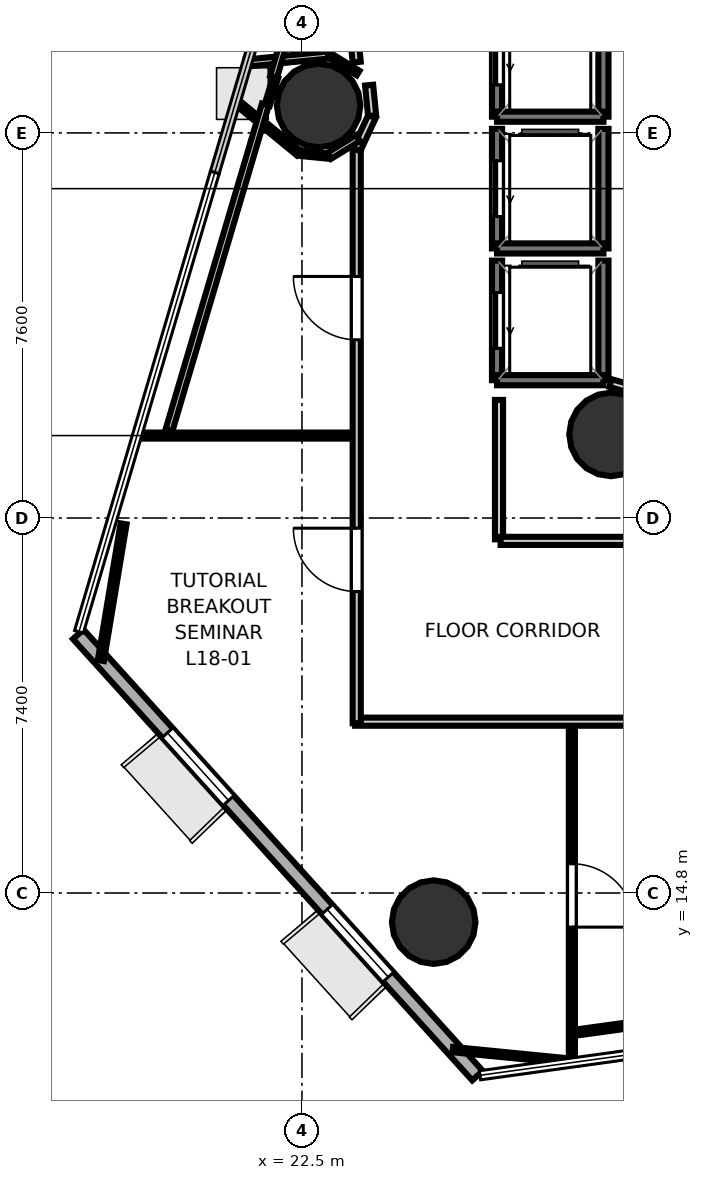
"""IFC4 building model, lengths in metres.
Left out: names, types, materials, properties, quantities, classifications, styles, units other than length and angle.
Written with IfcOpenShell. Run it as: python <this file> out.ifc"""

import sys

from ifc_helpers import new_model, si_unit, direction, frame, frame_2d, origin, origin_2d, place, context, subcontext, project, spatial, rectangle, hollow_circle, extrude, element, fill, save


model = new_model("IFC4")
c1 = context("Model", 3, precision=1e-05, world=origin(), true_north=direction((0.0, 1.0)))
c2 = subcontext(c1, "Body", "Model", "MODEL_VIEW")
j1 = project(units=[si_unit("LENGTHUNIT", "METRE"), si_unit("PLANEANGLEUNIT", "RADIAN")], contexts=[c1])
p1 = place(None, origin())
s1 = spatial("IfcSite", under=j1, at=p1, CompositionType="ELEMENT")
p2 = place(p1, origin())
s2 = spatial("IfcBuilding", under=s1, at=p2, CompositionType="ELEMENT")
p3 = place(p2, frame((0.0, 0.0, 74.7)))
s3 = spatial("IfcBuildingStorey", under=s2, at=p3, CompositionType="ELEMENT", Elevation=74.7)
for number, where, z_axis, x_axis in (
    (1, (28.6, 23.85, 0.0), (0.0, 0.0, 1.0), (1.0, 0.0, 0.0)),
    (2, (22.829, 30.34, 0.0), (0.0, 0.0, 1.0), (1.0, 0.0, 0.0)),
    (3, (25.1, 14.225, 0.0), (0.0, 0.0, 1.0), (1.0, 0.0, 0.0)),
):
    element("IfcColumn", number, at=place(p3, frame(where, z_axis=z_axis, x_axis=x_axis)), inside=s3, PredefinedType="COLUMN", context=c2, shape_type="SweptSolid", body=[
        extrude(hollow_circle(Radius=0.825, WallThickness=0.04, at=origin_2d()), origin(), (0.0, 0.0, 1.0), 3.7),
    ])
p4 = place(p3, frame((18.084, 19.906, 0.0), z_axis=(0.0, 0.0, 1.0), x_axis=(0.670879036758, -0.741566799445, 0.0)))
e4 = element("IfcWall", 4, at=p4, inside=s3, PredefinedType="SOLIDWALL", context=c2, shape_type="SweptSolid", body=[
    extrude(rectangle(XDim=11.746, YDim=0.28, at=frame_2d((5.873, 0.0))), origin(), (0.0, 0.0, 1.0), 3.52),
])
p5 = place(p4, frame((2.624, 0.0, 0.85)))
e5 = element("IfcOpeningElement", 5, at=p5, cuts=e4, PredefinedType="OPENING", context=c2, shape_type="SweptSolid", body=[
    extrude(rectangle(XDim=1.8, YDim=2.1, at=frame_2d((0.9, 1.05))), frame((0.0, 0.15, 0.0), z_axis=(0.0, -1.0, 0.0), x_axis=(1.0, 0.0, 0.0)), (0.0, 0.0, 1.0), 0.3),
])
p6 = place(p4, frame((7.323, 0.0, 0.85)))
e6 = element("IfcOpeningElement", 6, at=p6, cuts=e4, PredefinedType="OPENING", context=c2, shape_type="SweptSolid", body=[
    extrude(rectangle(XDim=1.8, YDim=2.1, at=frame_2d((0.9, 1.05))), frame((0.0, 0.15, 0.0), z_axis=(0.0, -1.0, 0.0), x_axis=(1.0, 0.0, 0.0)), (0.0, 0.0, 1.0), 0.3),
])
p7 = place(p3, frame((28.45, 30.12, 0.0), z_axis=(0.0, 0.0, 1.0), x_axis=(0.0, 1.0, 0.0)))
e7 = element("IfcWall", 7, at=p7, inside=s3, PredefinedType="SOLIDWALL", context=c2, shape_type="SweptSolid", body=[
    extrude(rectangle(XDim=2.36, YDim=0.2, at=frame_2d((1.18, 0.0))), origin(), (0.0, 0.0, 1.0), 3.52),
])
p8 = place(p3, frame((26.35, 30.12, 0.0), z_axis=(0.0, 0.0, 1.0), x_axis=(0.0, 1.0, 0.0)))
e8 = element("IfcWall", 8, at=p8, inside=s3, PredefinedType="SOLIDWALL", context=c2, shape_type="SweptSolid", body=[
    extrude(rectangle(XDim=2.36, YDim=0.2, at=frame_2d((1.18, 0.0))), origin(), (0.0, 0.0, 1.0), 3.52),
])
p9 = place(p8, frame((0.63, 0.0, 0.0)))
e9 = element("IfcOpeningElement", 9, at=p9, cuts=e8, PredefinedType="OPENING", context=c2, shape_type="SweptSolid", body=[
    extrude(rectangle(XDim=1.1, YDim=2.15, at=frame_2d((0.55, 1.075))), frame((0.0, 0.11, 0.0), z_axis=(0.0, -1.0, 0.0), x_axis=(1.0, 0.0, 0.0)), (0.0, 0.0, 1.0), 0.22),
])
p10 = place(p3, frame((26.35, 30.12, 0.0), z_axis=(0.0, 0.0, 1.0), x_axis=(1.0, 0.0, 0.0)))
e10 = element("IfcWall", 10, at=p10, inside=s3, PredefinedType="SOLIDWALL", context=c2, shape_type="SweptSolid", body=[
    extrude(rectangle(XDim=2.1, YDim=0.2, at=frame_2d((1.05, 0.0))), origin(), (0.0, 0.0, 1.0), 3.52),
])
p11 = place(p3, frame((28.45, 27.52, 0.0), z_axis=(0.0, 0.0, 1.0), x_axis=(0.0, 1.0, 0.0)))
e11 = element("IfcWall", 11, at=p11, inside=s3, PredefinedType="SOLIDWALL", context=c2, shape_type="SweptSolid", body=[
    extrude(rectangle(XDim=2.36, YDim=0.2, at=frame_2d((1.18, 0.0))), origin(), (0.0, 0.0, 1.0), 3.52),
])
p12 = place(p3, frame((26.35, 27.52, 0.0), z_axis=(0.0, 0.0, 1.0), x_axis=(0.0, 1.0, 0.0)))
e12 = element("IfcWall", 12, at=p12, inside=s3, PredefinedType="SOLIDWALL", context=c2, shape_type="SweptSolid", body=[
    extrude(rectangle(XDim=2.36, YDim=0.2, at=frame_2d((1.18, 0.0))), origin(), (0.0, 0.0, 1.0), 3.52),
])
p13 = place(p12, frame((0.63, 0.0, 0.0)))
e13 = element("IfcOpeningElement", 13, at=p13, cuts=e12, PredefinedType="OPENING", context=c2, shape_type="SweptSolid", body=[
    extrude(rectangle(XDim=1.1, YDim=2.15, at=frame_2d((0.55, 1.075))), frame((0.0, 0.11, 0.0), z_axis=(0.0, -1.0, 0.0), x_axis=(1.0, 0.0, 0.0)), (0.0, 0.0, 1.0), 0.22),
])
p14 = place(p3, frame((26.35, 27.52, 0.0), z_axis=(0.0, 0.0, 1.0), x_axis=(1.0, 0.0, 0.0)))
e14 = element("IfcWall", 14, at=p14, inside=s3, PredefinedType="SOLIDWALL", context=c2, shape_type="SweptSolid", body=[
    extrude(rectangle(XDim=2.1, YDim=0.2, at=frame_2d((1.05, 0.0))), origin(), (0.0, 0.0, 1.0), 3.52),
])
p15 = place(p3, frame((28.45, 24.92, 0.0), z_axis=(0.0, 0.0, 1.0), x_axis=(0.0, 1.0, 0.0)))
e15 = element("IfcWall", 15, at=p15, inside=s3, PredefinedType="SOLIDWALL", context=c2, shape_type="SweptSolid", body=[
    extrude(rectangle(XDim=2.36, YDim=0.2, at=frame_2d((1.18, 0.0))), origin(), (0.0, 0.0, 1.0), 3.52),
])
p16 = place(p3, frame((26.35, 24.92, 0.0), z_axis=(0.0, 0.0, 1.0), x_axis=(0.0, 1.0, 0.0)))
e16 = element("IfcWall", 16, at=p16, inside=s3, PredefinedType="SOLIDWALL", context=c2, shape_type="SweptSolid", body=[
    extrude(rectangle(XDim=2.36, YDim=0.2, at=frame_2d((1.18, 0.0))), origin(), (0.0, 0.0, 1.0), 3.52),
])
p17 = place(p16, frame((0.63, 0.0, 0.0)))
e17 = element("IfcOpeningElement", 17, at=p17, cuts=e16, PredefinedType="OPENING", context=c2, shape_type="SweptSolid", body=[
    extrude(rectangle(XDim=1.1, YDim=2.15, at=frame_2d((0.55, 1.075))), frame((0.0, 0.11, 0.0), z_axis=(0.0, -1.0, 0.0), x_axis=(1.0, 0.0, 0.0)), (0.0, 0.0, 1.0), 0.22),
])
p18 = place(p3, frame((26.35, 24.92, 0.0), z_axis=(0.0, 0.0, 1.0), x_axis=(1.0, 0.0, 0.0)))
e18 = element("IfcWall", 18, at=p18, inside=s3, PredefinedType="SOLIDWALL", context=c2, shape_type="SweptSolid", body=[
    extrude(rectangle(XDim=2.1, YDim=0.2, at=frame_2d((1.05, 0.0))), origin(), (0.0, 0.0, 1.0), 3.52),
])
p19 = place(p3, frame((29.13, 24.706, 0.0), z_axis=(0.0, 0.0, 1.0), x_axis=(-0.960451214223, 0.278448316742, 0.0)))
e19 = element("IfcWall", 19, at=p19, inside=s3, PredefinedType="PARTITIONING", context=c2, shape_type="SweptSolid", body=[
    extrude(rectangle(XDim=0.562, YDim=0.16, at=frame_2d((0.281, 0.0))), origin(), (0.0, 0.0, 1.0), 2.84),
])
p20 = place(p3, frame((23.581, 31.197, 0.0), z_axis=(0.0, 0.0, 1.0), x_axis=(-0.101076980701, 0.994878607656, 0.0)))
e20 = element("IfcWall", 20, at=p20, inside=s3, PredefinedType="PARTITIONING", context=c2, shape_type="SweptSolid", body=[
    extrude(rectangle(XDim=5.454, YDim=0.16, at=frame_2d((2.727, 0.0))), origin(), (0.0, 0.0, 1.0), 2.798),
])
p21 = place(p3, frame((26.389, 24.531, 0.0), z_axis=(0.0, 0.0, 1.0), x_axis=(0.0, -1.0, 0.0)))
e21 = element("IfcWall", 21, at=p21, inside=s3, PredefinedType="PARTITIONING", context=c2, shape_type="SweptSolid", body=[
    extrude(rectangle(XDim=2.75, YDim=0.16, at=frame_2d((1.375, 0.0))), origin(), (0.0, 0.0, 1.0), 2.84),
])
p22 = place(p3, frame((26.42, 21.749, 0.0), z_axis=(0.0, 0.0, 1.0), x_axis=(1.0, 0.0, 0.0)))
e22 = element("IfcWall", 22, at=p22, inside=s3, PredefinedType="PARTITIONING", context=c2, shape_type="SweptSolid", body=[
    extrude(rectangle(XDim=3.28, YDim=0.16, at=frame_2d((1.64, 0.0))), origin(), (0.0, 0.0, 1.0), 2.84),
])
p23 = place(p3, frame((33.32, 18.181, 0.0), z_axis=(0.0, 0.0, 1.0), x_axis=(-1.0, 0.0, 0.0)))
e23 = element("IfcWall", 23, at=p23, inside=s3, PredefinedType="PARTITIONING", context=c2, shape_type="SweptSolid", body=[
    extrude(rectangle(XDim=9.77, YDim=0.16, at=frame_2d((4.885, 0.0))), origin(), (0.0, 0.0, 1.0), 2.798),
])
p24 = place(p3, frame((23.581, 18.15, 0.0), z_axis=(0.0, 0.0, 1.0), x_axis=(0.0, 1.0, 0.0)))
e24 = element("IfcWall", 24, at=p24, inside=s3, PredefinedType="PARTITIONING", context=c2, shape_type="SweptSolid", body=[
    extrude(rectangle(XDim=11.333, YDim=0.16, at=frame_2d((5.667, 0.0))), origin(), (0.0, 0.0, 1.0), 2.798),
])
p25 = place(p24, frame((2.599, 0.0, 0.0)))
e25 = element("IfcOpeningElement", 25, at=p25, cuts=e24, PredefinedType="OPENING", context=c2, shape_type="SweptSolid", body=[
    extrude(rectangle(XDim=1.25, YDim=2.2, at=frame_2d((0.625, 1.1))), frame((0.0, 0.09, 0.0), z_axis=(0.0, -1.0, 0.0), x_axis=(1.0, 0.0, 0.0)), (0.0, 0.0, 1.0), 0.18),
])
p26 = place(p24, frame((7.567, 0.0, 0.0)))
e26 = element("IfcOpeningElement", 26, at=p26, cuts=e24, PredefinedType="OPENING", context=c2, shape_type="SweptSolid", body=[
    extrude(rectangle(XDim=1.25, YDim=2.2, at=frame_2d((0.625, 1.1))), frame((0.0, 0.09, 0.0), z_axis=(0.0, -1.0, 0.0), x_axis=(1.0, 0.0, 0.0)), (0.0, 0.0, 1.0), 0.18),
])
p27 = place(p3, frame((23.578, 29.47, 0.0), z_axis=(0.0, 0.0, 1.0), x_axis=(0.421827918194, 0.906675910914, 0.0)))
e27 = element("IfcWall", 27, at=p27, inside=s3, PredefinedType="PARTITIONING", context=c2, shape_type="SweptSolid", body=[
    extrude(rectangle(XDim=0.72, YDim=0.16, at=frame_2d((0.36, 0.0))), origin(), (0.0, 0.0, 1.0), 2.84),
])
p28 = place(p3, frame((23.885, 30.139, 0.0), z_axis=(0.0, 0.0, 1.0), x_axis=(-0.0981888168, 0.995167803064, 0.0)))
e28 = element("IfcWall", 28, at=p28, inside=s3, PredefinedType="PARTITIONING", context=c2, shape_type="SweptSolid", body=[
    extrude(rectangle(XDim=0.607, YDim=0.16, at=frame_2d((0.303, 0.0))), origin(), (0.0, 0.0, 1.0), 2.84),
])
p29 = place(p3, frame((19.224, 23.827, 0.0), z_axis=(0.0, 0.0, 1.0), x_axis=(1.0, 0.0, 0.0)))
e29 = element("IfcWall", 29, at=p29, inside=s3, PredefinedType="PARTITIONING", context=c2, shape_type="SweptSolid", body=[
    extrude(rectangle(XDim=4.246, YDim=0.12, at=frame_2d((2.123, 0.0))), origin(), (0.0, 0.0, 1.0), 2.84),
])
p30 = place(p3, frame((27.827, 18.07, 0.0), z_axis=(0.0, 0.0, 1.0), x_axis=(0.0, -1.0, 0.0)))
e30 = element("IfcWall", 30, at=p30, inside=s3, PredefinedType="PARTITIONING", context=c2, shape_type="SweptSolid", body=[
    extrude(rectangle(XDim=6.637, YDim=0.12, at=frame_2d((3.318, 0.0))), origin(), (0.0, 0.0, 1.0), 2.798),
])
p31 = place(p30, frame((2.693, 0.0, 0.0)))
e31 = element("IfcOpeningElement", 31, at=p31, cuts=e30, PredefinedType="OPENING", context=c2, shape_type="SweptSolid", body=[
    extrude(rectangle(XDim=1.25, YDim=2.2, at=frame_2d((0.625, 1.1))), frame((0.0, 0.07, 0.0), z_axis=(0.0, -1.0, 0.0), x_axis=(1.0, 0.0, 0.0)), (0.0, 0.0, 1.0), 0.14),
])
p32 = place(p3, frame((27.933, 11.468, 0.0), z_axis=(0.0, 0.0, 1.0), x_axis=(-0.995180170046, 0.098063393509, 0.0)))
e32 = element("IfcWall", 32, at=p32, inside=s3, PredefinedType="PARTITIONING", context=c2, shape_type="SweptSolid", body=[
    extrude(rectangle(XDim=2.467, YDim=0.105, at=frame_2d((1.234, 0.0))), origin(), (0.0, 0.0, 1.0), 2.84),
])
p33 = place(p3, frame((18.531, 19.387, 0.0), z_axis=(0.0, 0.0, 1.0), x_axis=(0.163689746408, 0.986511868616, 0.0)))
e33 = element("IfcWall", 33, at=p33, inside=s3, PredefinedType="PARTITIONING", context=c2, shape_type="SweptSolid", body=[
    extrude(rectangle(XDim=2.735, YDim=0.12, at=frame_2d((1.368, 0.0))), origin(), (0.0, 0.0, 1.0), 2.84),
])
p34 = place(p3, frame((40.054, 13.725, 0.0), z_axis=(0.0, 0.0, 1.0), x_axis=(-0.990575423536, -0.136968355055, 0.0)))
e34 = element("IfcWall", 34, at=p34, inside=s3, PredefinedType="PARTITIONING", context=c2, shape_type="SweptSolid", body=[
    extrude(rectangle(XDim=12.231, YDim=0.12, at=frame_2d((6.116, 0.0))), origin(), (0.0, 0.0, 1.0), 2.798),
])
p35 = place(p3, frame((23.608, 30.982, 0.0), z_axis=(0.0, 0.0, 1.0), x_axis=(-0.852045812822, 0.523467222328, 0.0)))
e35 = element("IfcWall", 35, at=p35, inside=s3, PredefinedType="PARTITIONING", context=c2, shape_type="SweptSolid", body=[
    extrude(rectangle(XDim=0.67, YDim=0.105, at=frame_2d((0.335, 0.0))), origin(), (0.0, 0.0, 1.0), 2.798),
])
p36 = place(p3, frame((23.018, 31.337, 0.0), z_axis=(0.0, 0.0, 1.0), x_axis=(-0.995184697451, -0.098017437019, 0.0)))
e36 = element("IfcWall", 36, at=p36, inside=s3, PredefinedType="PARTITIONING", context=c2, shape_type="SweptSolid", body=[
    extrude(rectangle(XDim=1.626, YDim=0.14, at=frame_2d((0.813, 0.0))), origin(), (0.0, 0.0, 1.0), 2.798),
])
p37 = place(p3, frame((21.98, 30.896, 0.0), z_axis=(0.0, 0.0, 1.0), x_axis=(-0.290362912899, -0.956916599716, 0.0)))
e37 = element("IfcWall", 37, at=p37, inside=s3, PredefinedType="PARTITIONING", context=c2, shape_type="SweptSolid", body=[
    extrude(rectangle(XDim=0.572, YDim=0.105, at=frame_2d((0.286, 0.0))), origin(), (0.0, 0.0, 1.0), 2.798),
])
p38 = place(p3, frame((21.18, 30.434, 0.0), z_axis=(0.0, 0.0, 1.0), x_axis=(0.773003277833, -0.634402027471, 0.0)))
e38 = element("IfcWall", 38, at=p38, inside=s3, PredefinedType="PARTITIONING", context=c2, shape_type="SweptSolid", body=[
    extrude(rectangle(XDim=1.621, YDim=0.12, at=frame_2d((0.81, 0.0))), origin(), (0.0, 0.0, 1.0), 2.798),
])
p39 = place(p3, frame((22.449, 29.399, 0.0), z_axis=(0.0, 0.0, 1.0), x_axis=(0.995167364461, -0.098193262045, 0.0)))
e39 = element("IfcWall", 39, at=p39, inside=s3, PredefinedType="PARTITIONING", context=c2, shape_type="SweptSolid", body=[
    extrude(rectangle(XDim=0.572, YDim=0.105, at=frame_2d((0.286, 0.0))), origin(), (0.0, 0.0, 1.0), 2.798),
])
p40 = place(p3, frame((23.037, 29.347, 0.0), z_axis=(0.0, 0.0, 1.0), x_axis=(0.852045812822, 0.523467222328, 0.0)))
e40 = element("IfcWall", 40, at=p40, inside=s3, PredefinedType="PARTITIONING", context=c2, shape_type="SweptSolid", body=[
    extrude(rectangle(XDim=0.67, YDim=0.14, at=frame_2d((0.335, 0.0))), origin(), (0.0, 0.0, 1.0), 2.798),
])
p41 = place(p3, frame((19.876, 23.933, 0.0), z_axis=(0.0, 0.0, 1.0), x_axis=(0.283652974155, 0.958926999439, 0.0)))
e41 = element("IfcWall", 41, at=p41, inside=s3, PredefinedType="PARTITIONING", context=c2, shape_type="SweptSolid", body=[
    extrude(rectangle(XDim=6.702, YDim=0.14, at=frame_2d((3.351, 0.0))), origin(), (0.0, 0.0, 1.0), 2.798),
])
p42 = place(p3, frame((21.94, 30.908, 0.0), z_axis=(0.0, 0.0, 1.0), x_axis=(0.283640865131, 0.958930581235, 0.0)))
e42 = element("IfcWall", 42, at=p42, inside=s3, PredefinedType="PARTITIONING", context=c2, shape_type="SweptSolid", body=[
    extrude(rectangle(XDim=2.545, YDim=0.14, at=frame_2d((1.272, 0.0))), origin(), (0.0, 0.0, 1.0), 2.798),
])
p43 = place(p9, origin())
e43 = element("IfcDoor", 43, at=p43, inside=s3, OperationType="SLIDING_TO_LEFT", PredefinedType="DOOR", context=c2, shape_type="SweptSolid", body=[
    extrude(rectangle(XDim=1.1, YDim=2.15, at=frame_2d((0.55, 1.075))), frame((0.0, 0.025, 0.0), z_axis=(0.0, -1.0, 0.0), x_axis=(1.0, 0.0, 0.0)), (0.0, 0.0, 1.0), 0.05),
])
fill(e9, e43)
p44 = place(p13, origin())
e44 = element("IfcDoor", 44, at=p44, inside=s3, OperationType="SLIDING_TO_LEFT", PredefinedType="DOOR", context=c2, shape_type="SweptSolid", body=[
    extrude(rectangle(XDim=1.1, YDim=2.15, at=frame_2d((0.55, 1.075))), frame((0.0, 0.025, 0.0), z_axis=(0.0, -1.0, 0.0), x_axis=(1.0, 0.0, 0.0)), (0.0, 0.0, 1.0), 0.05),
])
fill(e13, e44)
p45 = place(p17, origin())
e45 = element("IfcDoor", 45, at=p45, inside=s3, OperationType="SLIDING_TO_LEFT", PredefinedType="DOOR", context=c2, shape_type="SweptSolid", body=[
    extrude(rectangle(XDim=1.1, YDim=2.15, at=frame_2d((0.55, 1.075))), frame((0.0, 0.025, 0.0), z_axis=(0.0, -1.0, 0.0), x_axis=(1.0, 0.0, 0.0)), (0.0, 0.0, 1.0), 0.05),
])
fill(e17, e45)
p46 = place(p25, origin())
e46 = element("IfcDoor", 46, at=p46, inside=s3, OperationType="SINGLE_SWING_RIGHT", PredefinedType="DOOR", context=c2, shape_type="SweptSolid", body=[
    extrude(rectangle(XDim=1.25, YDim=2.2, at=frame_2d((0.625, 1.1))), frame((0.0, 0.025, 0.0), z_axis=(0.0, -1.0, 0.0), x_axis=(1.0, 0.0, 0.0)), (0.0, 0.0, 1.0), 0.05),
])
fill(e25, e46)
p47 = place(p26, origin())
e47 = element("IfcDoor", 47, at=p47, inside=s3, OperationType="SINGLE_SWING_RIGHT", PredefinedType="DOOR", context=c2, shape_type="SweptSolid", body=[
    extrude(rectangle(XDim=1.25, YDim=2.2, at=frame_2d((0.625, 1.1))), frame((0.0, 0.025, 0.0), z_axis=(0.0, -1.0, 0.0), x_axis=(1.0, 0.0, 0.0)), (0.0, 0.0, 1.0), 0.05),
])
fill(e26, e47)
p48 = place(p31, origin())
e48 = element("IfcDoor", 48, at=p48, inside=s3, OperationType="SINGLE_SWING_RIGHT", PredefinedType="DOOR", context=c2, shape_type="SweptSolid", body=[
    extrude(rectangle(XDim=1.25, YDim=2.2, at=frame_2d((0.625, 1.1))), frame((0.0, 0.025, 0.0), z_axis=(0.0, -1.0, 0.0), x_axis=(1.0, 0.0, 0.0)), (0.0, 0.0, 1.0), 0.05),
])
fill(e31, e48)
p49 = place(p5, origin())
e49 = element("IfcWindow", 49, at=p49, inside=s3, PartitioningType="SINGLE_PANEL", PredefinedType="WINDOW", context=c2, shape_type="SweptSolid", body=[
    extrude(rectangle(XDim=1.8, YDim=2.1, at=frame_2d((0.9, 1.05))), frame((0.0, 0.03, 0.0), z_axis=(0.0, -1.0, 0.0), x_axis=(1.0, 0.0, 0.0)), (0.0, 0.0, 1.0), 0.06),
])
fill(e5, e49)
p50 = place(p6, origin())
e50 = element("IfcWindow", 50, at=p50, inside=s3, PartitioningType="SINGLE_PANEL", PredefinedType="WINDOW", context=c2, shape_type="SweptSolid", body=[
    extrude(rectangle(XDim=1.8, YDim=2.1, at=frame_2d((0.9, 1.05))), frame((0.0, 0.03, 0.0), z_axis=(0.0, -1.0, 0.0), x_axis=(1.0, 0.0, 0.0)), (0.0, 0.0, 1.0), 0.06),
])
fill(e6, e50)
save(model, sys.argv[1])
